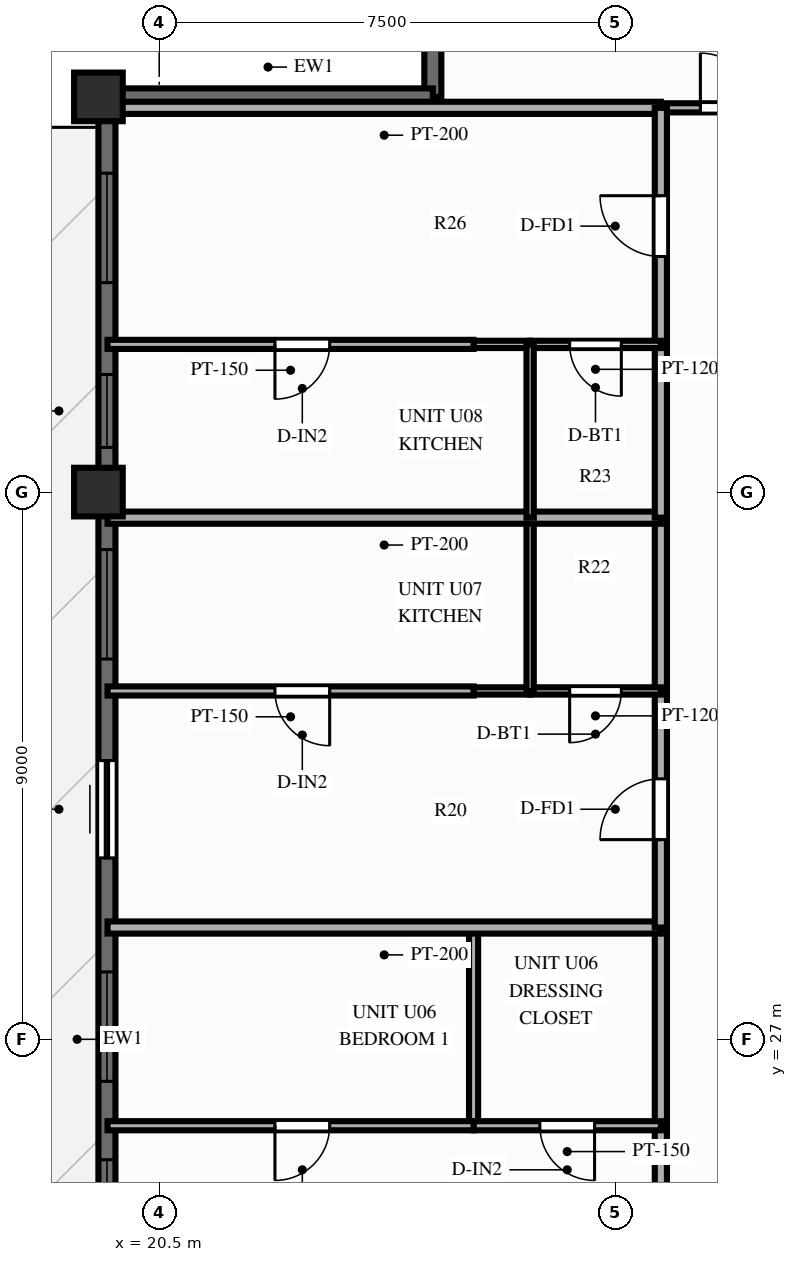
"""IFC4 building model, lengths in metres.
Left out: names, types, materials, properties, quantities, classifications, styles, units other than length and angle.
Written with IfcOpenShell. Run it as: python <this file> out.ifc"""

import sys

from ifc_helpers import new_model, si_unit, direction, frame, frame_2d, origin, origin_2d, place, context, subcontext, project, spatial, rectangle, extrude, source, transform, mapped, element, fill, save


model = new_model("IFC4")
c1 = context("Model", 3, precision=1e-05, world=origin(), true_north=direction((0.0, 1.0)))
c2 = subcontext(c1, "Body", "Model", "MODEL_VIEW")
j1 = project(units=[si_unit("LENGTHUNIT", "METRE"), si_unit("PLANEANGLEUNIT", "RADIAN")], contexts=[c1])
p1 = place(None, origin())
s1 = spatial("IfcSite", under=j1, at=p1, CompositionType="ELEMENT")
p2 = place(p1, origin())
s2 = spatial("IfcBuilding", under=s1, at=p2, CompositionType="ELEMENT")
p3 = place(p2, frame((0.0, 0.0, 202.6)))
s3 = spatial("IfcBuildingStorey", under=s2, at=p3, CompositionType="ELEMENT", Elevation=202.6)
m1 = source(origin(), c2, "Body", "SweptSolid", [
    extrude(rectangle(XDim=0.8, YDim=0.8, at=origin_2d()), origin(), (0.0, 0.0, 1.0), 3.9),
])
for number, where, z_axis, x_axis in (
    (1, (19.5, 42.5, 0.0), (0.0, 0.0, 1.0), (1.0, 0.0, 0.0)),
    (2, (19.5, 36.0, 0.0), (0.0, 0.0, 1.0), (1.0, 0.0, 0.0)),
):
    element("IfcColumn", number, at=place(p3, frame(where, z_axis=z_axis, x_axis=x_axis)), inside=s3, PredefinedType="COLUMN", context=c2, shape_type="MappedRepresentation", body=[
        mapped(m1, transform((0.0, 0.0, 0.0), scale=1.0)),
    ])
p4 = place(p3, frame((19.64, 11.5, 0.0), z_axis=(0.0, 0.0, 1.0), x_axis=(0.0, 1.0, 0.0)))
e3 = element("IfcWall", 3, at=p4, inside=s3, PredefinedType="SOLIDWALL", context=c2, shape_type="SweptSolid", body=[
    extrude(rectangle(XDim=31.0, YDim=0.28, at=frame_2d((15.5, 0.0))), origin(), (0.0, 0.0, 1.0), 2.79),
])
p5 = place(p4, frame((0.661, 0.0, 0.85)))
e4 = element("IfcOpeningElement", 4, at=p5, cuts=e3, PredefinedType="OPENING", context=c2, shape_type="SweptSolid", body=[
    extrude(rectangle(XDim=1.5, YDim=1.65, at=frame_2d((0.75, 0.825))), frame((0.0, 0.152, 0.0), z_axis=(0.0, -1.0, 0.0), x_axis=(1.0, 0.0, 0.0)), (0.0, 0.0, 1.0), 0.304),
])
p6 = place(p4, frame((3.131, 0.0, 0.85)))
e5 = element("IfcOpeningElement", 5, at=p6, cuts=e3, PredefinedType="OPENING", context=c2, shape_type="SweptSolid", body=[
    extrude(rectangle(XDim=1.5, YDim=1.65, at=frame_2d((0.75, 0.825))), frame((0.0, 0.152, 0.0), z_axis=(0.0, -1.0, 0.0), x_axis=(1.0, 0.0, 0.0)), (0.0, 0.0, 1.0), 0.304),
])
p7 = place(p4, frame((7.15, 0.0, 0.85)))
e6 = element("IfcOpeningElement", 6, at=p7, cuts=e3, PredefinedType="OPENING", context=c2, shape_type="SweptSolid", body=[
    extrude(rectangle(XDim=1.2, YDim=1.5, at=frame_2d((0.6, 0.75))), frame((0.0, 0.152, 0.0), z_axis=(0.0, -1.0, 0.0), x_axis=(1.0, 0.0, 0.0)), (0.0, 0.0, 1.0), 0.304),
])
p8 = place(p4, frame((9.21, 0.0, 0.85)))
e7 = element("IfcOpeningElement", 7, at=p8, cuts=e3, PredefinedType="OPENING", context=c2, shape_type="SweptSolid", body=[
    extrude(rectangle(XDim=1.5, YDim=1.65, at=frame_2d((0.75, 0.825))), frame((0.0, 0.152, 0.0), z_axis=(0.0, -1.0, 0.0), x_axis=(1.0, 0.0, 0.0)), (0.0, 0.0, 1.0), 0.304),
])
p9 = place(p4, frame((11.72, 0.0, 0.85)))
e8 = element("IfcOpeningElement", 8, at=p9, cuts=e3, PredefinedType="OPENING", context=c2, shape_type="SweptSolid", body=[
    extrude(rectangle(XDim=1.8, YDim=1.65, at=frame_2d((0.9, 0.825))), frame((0.0, 0.152, 0.0), z_axis=(0.0, -1.0, 0.0), x_axis=(1.0, 0.0, 0.0)), (0.0, 0.0, 1.0), 0.304),
])
p10 = place(p4, frame((14.808, 0.0, 0.85)))
e9 = element("IfcOpeningElement", 9, at=p10, cuts=e3, PredefinedType="OPENING", context=c2, shape_type="SweptSolid", body=[
    extrude(rectangle(XDim=1.8, YDim=1.65, at=frame_2d((0.9, 0.825))), frame((0.0, 0.152, 0.0), z_axis=(0.0, -1.0, 0.0), x_axis=(1.0, 0.0, 0.0)), (0.0, 0.0, 1.0), 0.304),
])
p11 = place(p4, frame((18.484, 0.0, 0.0)))
e10 = element("IfcOpeningElement", 10, at=p11, cuts=e3, PredefinedType="OPENING", context=c2, shape_type="SweptSolid", body=[
    extrude(rectangle(XDim=1.6, YDim=2.15, at=frame_2d((0.8, 1.075))), frame((0.0, 0.152, 0.0), z_axis=(0.0, -1.0, 0.0), x_axis=(1.0, 0.0, 0.0)), (0.0, 0.0, 1.0), 0.304),
])
p12 = place(p4, frame((21.754, 0.0, 0.85)))
e11 = element("IfcOpeningElement", 11, at=p12, cuts=e3, PredefinedType="OPENING", context=c2, shape_type="SweptSolid", body=[
    extrude(rectangle(XDim=1.8, YDim=1.65, at=frame_2d((0.9, 0.825))), frame((0.0, 0.152, 0.0), z_axis=(0.0, -1.0, 0.0), x_axis=(1.0, 0.0, 0.0)), (0.0, 0.0, 1.0), 0.304),
])
p13 = place(p4, frame((25.235, 0.0, 0.85)))
e12 = element("IfcOpeningElement", 12, at=p13, cuts=e3, PredefinedType="OPENING", context=c2, shape_type="SweptSolid", body=[
    extrude(rectangle(XDim=1.2, YDim=1.5, at=frame_2d((0.6, 0.75))), frame((0.0, 0.152, 0.0), z_axis=(0.0, -1.0, 0.0), x_axis=(1.0, 0.0, 0.0)), (0.0, 0.0, 1.0), 0.304),
])
p14 = place(p4, frame((27.945, 0.0, 0.85)))
e13 = element("IfcOpeningElement", 13, at=p14, cuts=e3, PredefinedType="OPENING", context=c2, shape_type="SweptSolid", body=[
    extrude(rectangle(XDim=1.8, YDim=1.65, at=frame_2d((0.9, 0.825))), frame((0.0, 0.152, 0.0), z_axis=(0.0, -1.0, 0.0), x_axis=(1.0, 0.0, 0.0)), (0.0, 0.0, 1.0), 0.304),
])
for number, where, z_axis, x_axis in (
    (14, (25.0, 42.5, 0.0), (0.0, 0.0, 1.0), (0.0, 1.0, 0.0)),
    (15, (19.58, 42.5, 0.0), (0.0, 0.0, 1.0), (1.0, 0.0, 0.0)),
):
    element("IfcWall", number, at=place(p3, frame(where, z_axis=z_axis, x_axis=x_axis)), inside=s3, PredefinedType="SOLIDWALL", context=c2, shape_type="SweptSolid", body=[
        extrude(rectangle(XDim=5.42, YDim=0.28, at=frame_2d((2.71, 0.0))), origin(), (0.0, 0.0, 1.0), 2.79),
    ])
p15 = place(p3, frame((28.85, 42.32, 0.0), z_axis=(0.0, 0.0, 1.0), x_axis=(1.0, 0.0, 0.0)))
e16 = element("IfcWall", 16, at=p15, inside=s3, PredefinedType="PARTITIONING", context=c2, shape_type="SweptSolid", body=[
    extrude(rectangle(XDim=2.33, YDim=0.15, at=frame_2d((1.165, 0.0))), origin(), (0.0, 0.0, 1.0), 3.6),
])
p16 = place(p15, frame((0.55, 0.0, 0.0)))
e17 = element("IfcOpeningElement", 17, at=p16, cuts=e16, PredefinedType="OPENING", context=c2, shape_type="SweptSolid", body=[
    extrude(rectangle(XDim=0.9, YDim=2.1, at=frame_2d((0.45, 1.05))), frame((0.0, 0.087, 0.0), z_axis=(0.0, -1.0, 0.0), x_axis=(1.0, 0.0, 0.0)), (0.0, 0.0, 1.0), 0.174),
])
p17 = place(p3, frame((28.75, 42.32, 0.0), z_axis=(0.0, 0.0, 1.0), x_axis=(-1.0, 0.0, 0.0)))
e18 = element("IfcWall", 18, at=p17, inside=s3, PredefinedType="PARTITIONING", context=c2, shape_type="SweptSolid", body=[
    extrude(rectangle(XDim=9.1, YDim=0.2, at=frame_2d((4.55, 0.0))), origin(), (0.0, 0.0, 1.0), 3.6),
])
p18 = place(p3, frame((28.75, 22.661, 0.0), z_axis=(0.0, 0.0, 1.0), x_axis=(0.0, 1.0, 0.0)))
e19 = element("IfcWall", 19, at=p18, inside=s3, PredefinedType="PARTITIONING", context=c2, shape_type="SweptSolid", body=[
    extrude(rectangle(XDim=2.917, YDim=0.2, at=frame_2d((1.458, 0.0))), origin(), (0.0, 0.0, 1.0), 3.6),
])
p19 = place(p18, frame((0.958, 0.0, 0.0)))
e20 = element("IfcOpeningElement", 20, at=p19, cuts=e19, PredefinedType="OPENING", context=c2, shape_type="SweptSolid", body=[
    extrude(rectangle(XDim=1.0, YDim=2.15, at=frame_2d((0.5, 1.075))), frame((0.0, 0.112, 0.0), z_axis=(0.0, -1.0, 0.0), x_axis=(1.0, 0.0, 0.0)), (0.0, 0.0, 1.0), 0.224),
])
p20 = place(p3, frame((28.75, 25.578, 0.0), z_axis=(0.0, 0.0, 1.0), x_axis=(0.0, 1.0, 0.0)))
e21 = element("IfcWall", 21, at=p20, inside=s3, PredefinedType="PARTITIONING", context=c2, shape_type="SweptSolid", body=[
    extrude(rectangle(XDim=3.26, YDim=0.2, at=frame_2d((1.63, 0.0))), origin(), (0.0, 0.0, 1.0), 3.6),
])
p21 = place(p3, frame((25.67, 25.578, 0.0), z_axis=(0.0, 0.0, 1.0), x_axis=(0.0, 1.0, 0.0)))
e22 = element("IfcWall", 22, at=p21, inside=s3, PredefinedType="PARTITIONING", context=c2, shape_type="SweptSolid", body=[
    extrude(rectangle(XDim=3.26, YDim=0.15, at=frame_2d((1.63, 0.0))), origin(), (0.0, 0.0, 1.0), 3.39),
])
p22 = place(p3, frame((28.75, 25.578, 0.0), z_axis=(0.0, 0.0, 1.0), x_axis=(-1.0, 0.0, 0.0)))
e23 = element("IfcWall", 23, at=p22, inside=s3, PredefinedType="PARTITIONING", context=c2, shape_type="SweptSolid", body=[
    extrude(rectangle(XDim=3.08, YDim=0.15, at=frame_2d((1.54, 0.0))), origin(), (0.0, 0.0, 1.0), 3.6),
])
p23 = place(p22, frame((1.09, 0.0, 0.0)))
e24 = element("IfcOpeningElement", 24, at=p23, cuts=e23, PredefinedType="OPENING", context=c2, shape_type="SweptSolid", body=[
    extrude(rectangle(XDim=0.9, YDim=2.1, at=frame_2d((0.45, 1.05))), frame((0.0, 0.087, 0.0), z_axis=(0.0, -1.0, 0.0), x_axis=(1.0, 0.0, 0.0)), (0.0, 0.0, 1.0), 0.174),
])
p24 = place(p3, frame((25.67, 25.578, 0.0), z_axis=(0.0, 0.0, 1.0), x_axis=(-1.0, 0.0, 0.0)))
e25 = element("IfcWall", 25, at=p24, inside=s3, PredefinedType="PARTITIONING", context=c2, shape_type="SweptSolid", body=[
    extrude(rectangle(XDim=6.02, YDim=0.15, at=frame_2d((3.01, 0.0))), origin(), (0.0, 0.0, 1.0), 3.6),
])
p25 = place(p24, frame((2.367, 0.0, 0.0)))
e26 = element("IfcOpeningElement", 26, at=p25, cuts=e25, PredefinedType="OPENING", context=c2, shape_type="SweptSolid", body=[
    extrude(rectangle(XDim=0.9, YDim=2.1, at=frame_2d((0.45, 1.05))), frame((0.0, 0.087, 0.0), z_axis=(0.0, -1.0, 0.0), x_axis=(1.0, 0.0, 0.0)), (0.0, 0.0, 1.0), 0.174),
])
p26 = place(p3, frame((28.75, 28.838, 0.0), z_axis=(0.0, 0.0, 1.0), x_axis=(-1.0, 0.0, 0.0)))
e27 = element("IfcWall", 27, at=p26, inside=s3, PredefinedType="PARTITIONING", context=c2, shape_type="SweptSolid", body=[
    extrude(rectangle(XDim=9.1, YDim=0.2, at=frame_2d((4.55, 0.0))), origin(), (0.0, 0.0, 1.0), 3.6),
])
p27 = place(p3, frame((28.75, 28.838, 0.0), z_axis=(0.0, 0.0, 1.0), x_axis=(0.0, 1.0, 0.0)))
e28 = element("IfcWall", 28, at=p27, inside=s3, PredefinedType="PARTITIONING", context=c2, shape_type="SweptSolid", body=[
    extrude(rectangle(XDim=3.891, YDim=0.2, at=frame_2d((1.945, 0.0))), origin(), (0.0, 0.0, 1.0), 3.6),
])
p28 = place(p27, frame((1.445, 0.0, 0.0)))
e29 = element("IfcOpeningElement", 29, at=p28, cuts=e28, PredefinedType="OPENING", context=c2, shape_type="SweptSolid", body=[
    extrude(rectangle(XDim=1.0, YDim=2.15, at=frame_2d((0.5, 1.075))), frame((0.0, 0.112, 0.0), z_axis=(0.0, -1.0, 0.0), x_axis=(1.0, 0.0, 0.0)), (0.0, 0.0, 1.0), 0.224),
])
p29 = place(p3, frame((28.75, 32.729, 0.0), z_axis=(0.0, 0.0, 1.0), x_axis=(0.0, 1.0, 0.0)))
e30 = element("IfcWall", 30, at=p29, inside=s3, PredefinedType="PARTITIONING", context=c2, shape_type="SweptSolid", body=[
    extrude(rectangle(XDim=2.85, YDim=0.2, at=frame_2d((1.425, 0.0))), origin(), (0.0, 0.0, 1.0), 3.6),
])
p30 = place(p3, frame((28.75, 32.729, 0.0), z_axis=(0.0, 0.0, 1.0), x_axis=(-1.0, 0.0, 0.0)))
e31 = element("IfcWall", 31, at=p30, inside=s3, PredefinedType="PARTITIONING", context=c2, shape_type="SweptSolid", body=[
    extrude(rectangle(XDim=2.15, YDim=0.12, at=frame_2d((1.075, 0.0))), origin(), (0.0, 0.0, 1.0), 3.6),
])
p31 = place(p30, frame((0.65, 0.0, 0.0)))
e32 = element("IfcOpeningElement", 32, at=p31, cuts=e31, PredefinedType="OPENING", context=c2, shape_type="SweptSolid", body=[
    extrude(rectangle(XDim=0.85, YDim=2.05, at=frame_2d((0.425, 1.025))), frame((0.0, 0.072, 0.0), z_axis=(0.0, -1.0, 0.0), x_axis=(1.0, 0.0, 0.0)), (0.0, 0.0, 1.0), 0.144),
])
p32 = place(p3, frame((26.6, 32.729, 0.0), z_axis=(0.0, 0.0, 1.0), x_axis=(-1.0, 0.0, 0.0)))
e33 = element("IfcWall", 33, at=p32, inside=s3, PredefinedType="PARTITIONING", context=c2, shape_type="SweptSolid", body=[
    extrude(rectangle(XDim=0.93, YDim=0.12, at=frame_2d((0.465, 0.0))), origin(), (0.0, 0.0, 1.0), 3.6),
])
p33 = place(p3, frame((26.6, 32.729, 0.0), z_axis=(0.0, 0.0, 1.0), x_axis=(0.0, 1.0, 0.0)))
e34 = element("IfcWall", 34, at=p33, inside=s3, PredefinedType="PARTITIONING", context=c2, shape_type="SweptSolid", body=[
    extrude(rectangle(XDim=2.85, YDim=0.12, at=frame_2d((1.425, 0.0))), origin(), (0.0, 0.0, 1.0), 3.6),
])
p34 = place(p3, frame((25.67, 32.729, 0.0), z_axis=(0.0, 0.0, 1.0), x_axis=(-1.0, 0.0, 0.0)))
e35 = element("IfcWall", 35, at=p34, inside=s3, PredefinedType="PARTITIONING", context=c2, shape_type="SweptSolid", body=[
    extrude(rectangle(XDim=6.02, YDim=0.15, at=frame_2d((3.01, 0.0))), origin(), (0.0, 0.0, 1.0), 3.6),
])
p35 = place(p34, frame((2.367, 0.0, 0.0)))
e36 = element("IfcOpeningElement", 36, at=p35, cuts=e35, PredefinedType="OPENING", context=c2, shape_type="SweptSolid", body=[
    extrude(rectangle(XDim=0.9, YDim=2.1, at=frame_2d((0.45, 1.05))), frame((0.0, 0.087, 0.0), z_axis=(0.0, -1.0, 0.0), x_axis=(1.0, 0.0, 0.0)), (0.0, 0.0, 1.0), 0.174),
])
p36 = place(p3, frame((28.75, 35.579, 0.0), z_axis=(0.0, 0.0, 1.0), x_axis=(-1.0, 0.0, 0.0)))
e37 = element("IfcWall", 37, at=p36, inside=s3, PredefinedType="PARTITIONING", context=c2, shape_type="SweptSolid", body=[
    extrude(rectangle(XDim=9.1, YDim=0.2, at=frame_2d((4.55, 0.0))), origin(), (0.0, 0.0, 1.0), 3.6),
])
p37 = place(p3, frame((28.75, 35.579, 0.0), z_axis=(0.0, 0.0, 1.0), x_axis=(0.0, 1.0, 0.0)))
e38 = element("IfcWall", 38, at=p37, inside=s3, PredefinedType="PARTITIONING", context=c2, shape_type="SweptSolid", body=[
    extrude(rectangle(XDim=2.85, YDim=0.2, at=frame_2d((1.425, 0.0))), origin(), (0.0, 0.0, 1.0), 3.6),
])
p38 = place(p3, frame((28.75, 38.429, 0.0), z_axis=(0.0, 0.0, 1.0), x_axis=(0.0, 1.0, 0.0)))
e39 = element("IfcWall", 39, at=p38, inside=s3, PredefinedType="PARTITIONING", context=c2, shape_type="SweptSolid", body=[
    extrude(rectangle(XDim=3.891, YDim=0.2, at=frame_2d((1.945, 0.0))), origin(), (0.0, 0.0, 1.0), 3.6),
])
p39 = place(p38, frame((1.445, 0.0, 0.0)))
e40 = element("IfcOpeningElement", 40, at=p39, cuts=e39, PredefinedType="OPENING", context=c2, shape_type="SweptSolid", body=[
    extrude(rectangle(XDim=1.0, YDim=2.15, at=frame_2d((0.5, 1.075))), frame((0.0, 0.112, 0.0), z_axis=(0.0, -1.0, 0.0), x_axis=(1.0, 0.0, 0.0)), (0.0, 0.0, 1.0), 0.224),
])
p40 = place(p3, frame((28.75, 38.429, 0.0), z_axis=(0.0, 0.0, 1.0), x_axis=(-1.0, 0.0, 0.0)))
e41 = element("IfcWall", 41, at=p40, inside=s3, PredefinedType="PARTITIONING", context=c2, shape_type="SweptSolid", body=[
    extrude(rectangle(XDim=2.15, YDim=0.12, at=frame_2d((1.075, 0.0))), origin(), (0.0, 0.0, 1.0), 3.6),
])
p41 = place(p40, frame((0.65, 0.0, 0.0)))
e42 = element("IfcOpeningElement", 42, at=p41, cuts=e41, PredefinedType="OPENING", context=c2, shape_type="SweptSolid", body=[
    extrude(rectangle(XDim=0.85, YDim=2.05, at=frame_2d((0.425, 1.025))), frame((0.0, 0.072, 0.0), z_axis=(0.0, -1.0, 0.0), x_axis=(1.0, 0.0, 0.0)), (0.0, 0.0, 1.0), 0.144),
])
p42 = place(p3, frame((26.6, 38.429, 0.0), z_axis=(0.0, 0.0, 1.0), x_axis=(-1.0, 0.0, 0.0)))
e43 = element("IfcWall", 43, at=p42, inside=s3, PredefinedType="PARTITIONING", context=c2, shape_type="SweptSolid", body=[
    extrude(rectangle(XDim=0.93, YDim=0.12, at=frame_2d((0.465, 0.0))), origin(), (0.0, 0.0, 1.0), 3.6),
])
p43 = place(p3, frame((26.6, 35.579, 0.0), z_axis=(0.0, 0.0, 1.0), x_axis=(0.0, 1.0, 0.0)))
e44 = element("IfcWall", 44, at=p43, inside=s3, PredefinedType="PARTITIONING", context=c2, shape_type="SweptSolid", body=[
    extrude(rectangle(XDim=2.85, YDim=0.12, at=frame_2d((1.425, 0.0))), origin(), (0.0, 0.0, 1.0), 3.6),
])
p44 = place(p3, frame((25.67, 38.429, 0.0), z_axis=(0.0, 0.0, 1.0), x_axis=(-1.0, 0.0, 0.0)))
e45 = element("IfcWall", 45, at=p44, inside=s3, PredefinedType="PARTITIONING", context=c2, shape_type="SweptSolid", body=[
    extrude(rectangle(XDim=6.02, YDim=0.15, at=frame_2d((3.01, 0.0))), origin(), (0.0, 0.0, 1.0), 3.6),
])
p45 = place(p44, frame((2.367, 0.0, 0.0)))
e46 = element("IfcOpeningElement", 46, at=p45, cuts=e45, PredefinedType="OPENING", context=c2, shape_type="SweptSolid", body=[
    extrude(rectangle(XDim=0.9, YDim=2.1, at=frame_2d((0.45, 1.05))), frame((0.0, 0.087, 0.0), z_axis=(0.0, -1.0, 0.0), x_axis=(1.0, 0.0, 0.0)), (0.0, 0.0, 1.0), 0.174),
])
m2 = source(origin(), c2, "Body", "SweptSolid", [
    extrude(rectangle(XDim=1.8, YDim=1.65, at=frame_2d((0.9, 0.825))), frame((0.0, 0.03, 0.0), z_axis=(0.0, -1.0, 0.0), x_axis=(1.0, 0.0, 0.0)), (0.0, 0.0, 1.0), 0.06),
])
p46 = place(p9, origin())
e47 = element("IfcWindow", 47, at=p46, inside=s3, PartitioningType="SINGLE_PANEL", PredefinedType="WINDOW", context=c2, shape_type="MappedRepresentation", body=[
    mapped(m2, transform((0.0, 0.0, 0.0), scale=1.0)),
])
fill(e8, e47)
p47 = place(p10, origin())
e48 = element("IfcWindow", 48, at=p47, inside=s3, PartitioningType="SINGLE_PANEL", PredefinedType="WINDOW", context=c2, shape_type="MappedRepresentation", body=[
    mapped(m2, transform((0.0, 0.0, 0.0), scale=1.0)),
])
fill(e9, e48)
m3 = source(origin(), c2, "Body", "SweptSolid", [
    extrude(rectangle(XDim=1.6, YDim=2.15, at=frame_2d((0.8, 1.075))), frame((0.0, 0.025, 0.0), z_axis=(0.0, -1.0, 0.0), x_axis=(1.0, 0.0, 0.0)), (0.0, 0.0, 1.0), 0.05),
])
p48 = place(p11, origin())
e49 = element("IfcDoor", 49, at=p48, inside=s3, OperationType="SLIDING_TO_LEFT", PredefinedType="DOOR", context=c2, shape_type="MappedRepresentation", body=[
    mapped(m3, transform((0.0, 0.0, 0.0), scale=1.0)),
])
fill(e10, e49)
p49 = place(p12, origin())
e50 = element("IfcWindow", 50, at=p49, inside=s3, PartitioningType="SINGLE_PANEL", PredefinedType="WINDOW", context=c2, shape_type="MappedRepresentation", body=[
    mapped(m2, transform((0.0, 0.0, 0.0), scale=1.0)),
])
fill(e11, e50)
m4 = source(origin(), c2, "Body", "SweptSolid", [
    extrude(rectangle(XDim=1.2, YDim=1.5, at=frame_2d((0.6, 0.75))), frame((0.0, 0.03, 0.0), z_axis=(0.0, -1.0, 0.0), x_axis=(1.0, 0.0, 0.0)), (0.0, 0.0, 1.0), 0.06),
])
p50 = place(p13, origin())
e51 = element("IfcWindow", 51, at=p50, inside=s3, PartitioningType="SINGLE_PANEL", PredefinedType="WINDOW", context=c2, shape_type="MappedRepresentation", body=[
    mapped(m4, transform((0.0, 0.0, 0.0), scale=1.0)),
])
fill(e12, e51)
p51 = place(p14, origin())
e52 = element("IfcWindow", 52, at=p51, inside=s3, PartitioningType="SINGLE_PANEL", PredefinedType="WINDOW", context=c2, shape_type="MappedRepresentation", body=[
    mapped(m2, transform((0.0, 0.0, 0.0), scale=1.0)),
])
fill(e13, e52)
m5 = source(origin(), c2, "Body", "SweptSolid", [
    extrude(rectangle(XDim=0.9, YDim=2.1, at=frame_2d((0.45, 1.05))), frame((0.0, 0.025, 0.0), z_axis=(0.0, -1.0, 0.0), x_axis=(1.0, 0.0, 0.0)), (0.0, 0.0, 1.0), 0.05),
])
p52 = place(p16, origin())
e53 = element("IfcDoor", 53, at=p52, inside=s3, OperationType="SINGLE_SWING_LEFT", PredefinedType="DOOR", context=c2, shape_type="MappedRepresentation", body=[
    mapped(m5, transform((0.0, 0.0, 0.0), scale=1.0)),
])
fill(e17, e53)
p53 = place(p23, origin())
e54 = element("IfcDoor", 54, at=p53, inside=s3, OperationType="SINGLE_SWING_LEFT", PredefinedType="DOOR", context=c2, shape_type="MappedRepresentation", body=[
    mapped(m5, transform((0.0, 0.0, 0.0), scale=1.0)),
])
fill(e24, e54)
p54 = place(p25, origin())
e55 = element("IfcDoor", 55, at=p54, inside=s3, OperationType="SINGLE_SWING_RIGHT", PredefinedType="DOOR", context=c2, shape_type="MappedRepresentation", body=[
    mapped(m5, transform((0.0, 0.0, 0.0), scale=1.0)),
])
fill(e26, e55)
m6 = source(origin(), c2, "Body", "SweptSolid", [
    extrude(rectangle(XDim=1.0, YDim=2.15, at=frame_2d((0.5, 1.075))), frame((0.0, 0.025, 0.0), z_axis=(0.0, -1.0, 0.0), x_axis=(1.0, 0.0, 0.0)), (0.0, 0.0, 1.0), 0.05),
])
p55 = place(p28, origin())
e56 = element("IfcDoor", 56, at=p55, inside=s3, OperationType="SINGLE_SWING_LEFT", PredefinedType="DOOR", context=c2, shape_type="MappedRepresentation", body=[
    mapped(m6, transform((0.0, 0.0, 0.0), scale=1.0)),
])
fill(e29, e56)
m7 = source(origin(), c2, "Body", "SweptSolid", [
    extrude(rectangle(XDim=0.85, YDim=2.05, at=frame_2d((0.425, 1.025))), frame((0.0, 0.025, 0.0), z_axis=(0.0, -1.0, 0.0), x_axis=(1.0, 0.0, 0.0)), (0.0, 0.0, 1.0), 0.05),
])
p56 = place(p31, origin())
e57 = element("IfcDoor", 57, at=p56, inside=s3, OperationType="SINGLE_SWING_RIGHT", PredefinedType="DOOR", context=c2, shape_type="MappedRepresentation", body=[
    mapped(m7, transform((0.0, 0.0, 0.0), scale=1.0)),
])
fill(e32, e57)
p57 = place(p35, origin())
e58 = element("IfcDoor", 58, at=p57, inside=s3, OperationType="SINGLE_SWING_LEFT", PredefinedType="DOOR", context=c2, shape_type="MappedRepresentation", body=[
    mapped(m5, transform((0.0, 0.0, 0.0), scale=1.0)),
])
fill(e36, e58)
p58 = place(p39, origin())
e59 = element("IfcDoor", 59, at=p58, inside=s3, OperationType="SINGLE_SWING_RIGHT", PredefinedType="DOOR", context=c2, shape_type="MappedRepresentation", body=[
    mapped(m6, transform((0.0, 0.0, 0.0), scale=1.0)),
])
fill(e40, e59)
p59 = place(p41, origin())
e60 = element("IfcDoor", 60, at=p59, inside=s3, OperationType="SINGLE_SWING_LEFT", PredefinedType="DOOR", context=c2, shape_type="MappedRepresentation", body=[
    mapped(m7, transform((0.0, 0.0, 0.0), scale=1.0)),
])
fill(e42, e60)
p60 = place(p45, origin())
e61 = element("IfcDoor", 61, at=p60, inside=s3, OperationType="SINGLE_SWING_RIGHT", PredefinedType="DOOR", context=c2, shape_type="MappedRepresentation", body=[
    mapped(m5, transform((0.0, 0.0, 0.0), scale=1.0)),
])
fill(e46, e61)
save(model, sys.argv[1])
